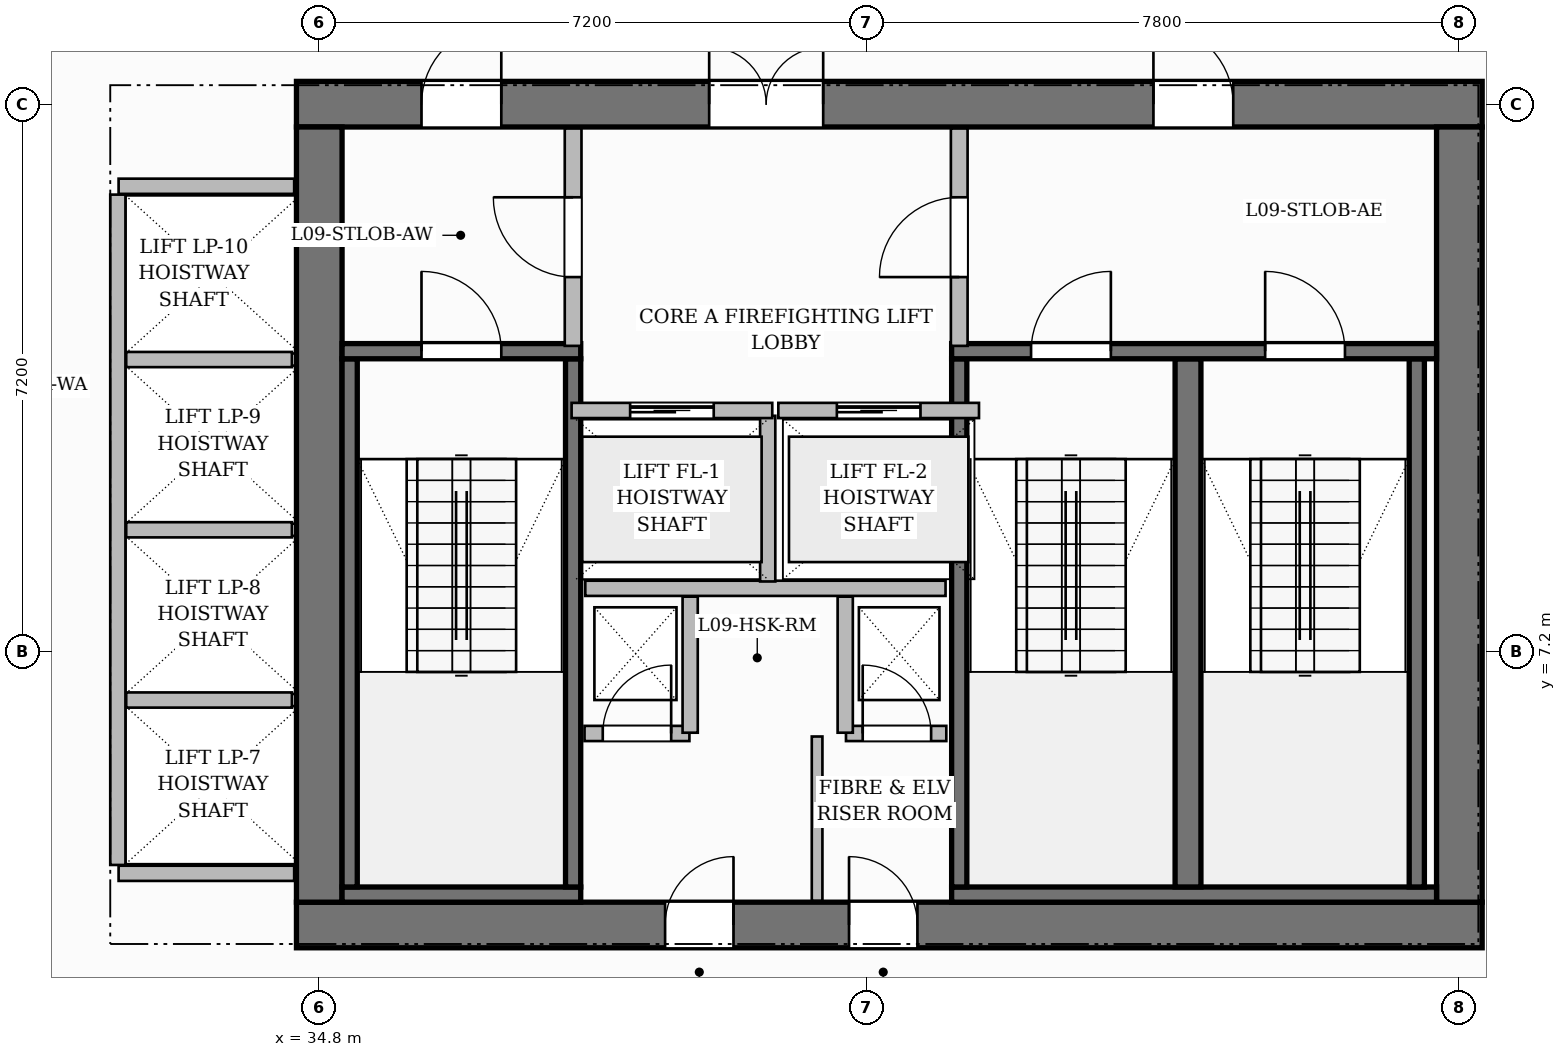
"""IFC4 building model, lengths in metres.
Left out: names, types, materials, properties, quantities, classifications, styles, units other than length and angle.
Written with IfcOpenShell. Run it as: python <this file> out.ifc"""

import sys

from ifc_helpers import new_model, si_unit, direction, frame, frame_2d, origin, place, context, subcontext, project, spatial, rectangle, extrude, source, transform, mapped, element, fill, save


model = new_model("IFC4")
c1 = context("Model", 3, precision=1e-05, world=origin(), true_north=direction((0.0, 1.0)))
c2 = subcontext(c1, "Body", "Model", "MODEL_VIEW")
j1 = project(units=[si_unit("LENGTHUNIT", "METRE"), si_unit("PLANEANGLEUNIT", "RADIAN")], contexts=[c1])
p1 = place(None, origin())
s1 = spatial("IfcSite", under=j1, at=p1, CompositionType="ELEMENT")
p2 = place(p1, origin())
s2 = spatial("IfcBuilding", under=s1, at=p2, CompositionType="ELEMENT")
p3 = place(p2, frame((0.0, 0.0, 43.5)))
s3 = spatial("IfcBuildingStorey", under=s2, at=p3, CompositionType="ELEMENT", Elevation=43.5)
p4 = place(p3, frame((34.5, 3.6, 0.0), z_axis=(0.0, 0.0, 1.0), x_axis=(1.0, 0.0, 0.0)))
e1 = element("IfcWall", 1, at=p4, inside=s3, PredefinedType="SHEAR", context=c2, shape_type="SweptSolid", body=[
    extrude(rectangle(XDim=15.6, YDim=0.6, at=frame_2d((7.8, 0.0))), origin(), (0.0, 0.0, 1.0), 3.7),
])
p5 = place(p4, frame((4.85, 0.0, 0.0)))
e2 = element("IfcOpeningElement", 2, at=p5, cuts=e1, PredefinedType="OPENING", context=c2, shape_type="SweptSolid", body=[
    extrude(rectangle(XDim=0.9, YDim=2.1, at=frame_2d((0.45, 1.05))), frame((0.0, 0.31, 0.0), z_axis=(0.0, -1.0, 0.0), x_axis=(1.0, 0.0, 0.0)), (0.0, 0.0, 1.0), 0.62),
])
p6 = place(p4, frame((7.27, 0.0, 0.0)))
e3 = element("IfcOpeningElement", 3, at=p6, cuts=e1, PredefinedType="OPENING", context=c2, shape_type="SweptSolid", body=[
    extrude(rectangle(XDim=0.9, YDim=2.1, at=frame_2d((0.45, 1.05))), frame((0.0, 0.31, 0.0), z_axis=(0.0, -1.0, 0.0), x_axis=(1.0, 0.0, 0.0)), (0.0, 0.0, 1.0), 0.62),
])
p7 = place(p3, frame((34.5, 14.4, 0.0), z_axis=(0.0, 0.0, 1.0), x_axis=(1.0, 0.0, 0.0)))
e4 = element("IfcWall", 4, at=p7, inside=s3, PredefinedType="SHEAR", context=c2, shape_type="SweptSolid", body=[
    extrude(rectangle(XDim=15.6, YDim=0.6, at=frame_2d((7.8, 0.0))), origin(), (0.0, 0.0, 1.0), 3.7),
])
p8 = place(p7, frame((5.43, 0.0, 0.0)))
e5 = element("IfcOpeningElement", 5, at=p8, cuts=e4, PredefinedType="OPENING", context=c2, shape_type="SweptSolid", body=[
    extrude(rectangle(XDim=1.5, YDim=2.2, at=frame_2d((0.75, 1.1))), frame((0.0, 0.31, 0.0), z_axis=(0.0, -1.0, 0.0), x_axis=(1.0, 0.0, 0.0)), (0.0, 0.0, 1.0), 0.62),
])
p9 = place(p7, frame((1.645, 0.0, 0.0)))
e6 = element("IfcOpeningElement", 6, at=p9, cuts=e4, PredefinedType="OPENING", context=c2, shape_type="SweptSolid", body=[
    extrude(rectangle(XDim=1.05, YDim=2.15, at=frame_2d((0.525, 1.075))), frame((0.0, 0.31, 0.0), z_axis=(0.0, -1.0, 0.0), x_axis=(1.0, 0.0, 0.0)), (0.0, 0.0, 1.0), 0.62),
])
p10 = place(p7, frame((11.275, 0.0, 0.0)))
e7 = element("IfcOpeningElement", 7, at=p10, cuts=e4, PredefinedType="OPENING", context=c2, shape_type="SweptSolid", body=[
    extrude(rectangle(XDim=1.05, YDim=2.15, at=frame_2d((0.525, 1.075))), frame((0.0, 0.31, 0.0), z_axis=(0.0, -1.0, 0.0), x_axis=(1.0, 0.0, 0.0)), (0.0, 0.0, 1.0), 0.62),
])
for number, where, z_axis, x_axis in (
    (8, (34.8, 3.9, 0.0), (0.0, 0.0, 1.0), (0.0, 1.0, 0.0)),
    (9, (49.8, 3.9, 0.0), (0.0, 0.0, 1.0), (0.0, 1.0, 0.0)),
):
    element("IfcWall", number, at=place(p3, frame(where, z_axis=z_axis, x_axis=x_axis)), inside=s3, PredefinedType="SHEAR", context=c2, shape_type="SweptSolid", body=[
        extrude(rectangle(XDim=10.2, YDim=0.6, at=frame_2d((5.1, 0.0))), origin(), (0.0, 0.0, 1.0), 3.7),
    ])
p11 = place(p3, frame((35.1, 4.0, 0.0), z_axis=(0.0, 0.0, 1.0), x_axis=(1.0, 0.0, 0.0)))
e10 = element("IfcWall", 10, at=p11, inside=s3, PredefinedType="SHEAR", context=c2, shape_type="SweptSolid", body=[
    extrude(rectangle(XDim=3.14, YDim=0.2, at=frame_2d((1.57, 0.0))), origin(), (0.0, 0.0, 1.0), 3.7),
])
for number, where, z_axis, x_axis in (
    (11, (35.2, 4.1, 0.0), (0.0, 0.0, 1.0), (0.0, 1.0, 0.0)),
    (12, (38.14, 4.1, 0.0), (0.0, 0.0, 1.0), (0.0, 1.0, 0.0)),
):
    element("IfcWall", number, at=place(p3, frame(where, z_axis=z_axis, x_axis=x_axis)), inside=s3, PredefinedType="SHEAR", context=c2, shape_type="SweptSolid", body=[
        extrude(rectangle(XDim=6.95, YDim=0.2, at=frame_2d((3.475, 0.0))), origin(), (0.0, 0.0, 1.0), 3.7),
    ])
p12 = place(p3, frame((35.1, 11.15, 0.0), z_axis=(0.0, 0.0, 1.0), x_axis=(1.0, 0.0, 0.0)))
e13 = element("IfcWall", 13, at=p12, inside=s3, PredefinedType="SHEAR", context=c2, shape_type="SweptSolid", body=[
    extrude(rectangle(XDim=3.14, YDim=0.2, at=frame_2d((1.57, 0.0))), origin(), (0.0, 0.0, 1.0), 3.7),
])
p13 = place(p12, frame((1.045, 0.0, 0.0)))
e14 = element("IfcOpeningElement", 14, at=p13, cuts=e13, PredefinedType="OPENING", context=c2, shape_type="SweptSolid", body=[
    extrude(rectangle(XDim=1.05, YDim=2.2, at=frame_2d((0.525, 1.1))), frame((0.0, 0.11, 0.0), z_axis=(0.0, -1.0, 0.0), x_axis=(1.0, 0.0, 0.0)), (0.0, 0.0, 1.0), 0.22),
])
p14 = place(p3, frame((43.12, 4.0, 0.0), z_axis=(0.0, 0.0, 1.0), x_axis=(1.0, 0.0, 0.0)))
e15 = element("IfcWall", 15, at=p14, inside=s3, PredefinedType="SHEAR", context=c2, shape_type="SweptSolid", body=[
    extrude(rectangle(XDim=6.38, YDim=0.2, at=frame_2d((3.19, 0.0))), origin(), (0.0, 0.0, 1.0), 3.7),
])
p15 = place(p3, frame((43.22, 4.1, 0.0), z_axis=(0.0, 0.0, 1.0), x_axis=(0.0, 1.0, 0.0)))
e16 = element("IfcWall", 16, at=p15, inside=s3, PredefinedType="SHEAR", context=c2, shape_type="SweptSolid", body=[
    extrude(rectangle(XDim=6.95, YDim=0.2, at=frame_2d((3.475, 0.0))), origin(), (0.0, 0.0, 1.0), 3.7),
])
p16 = place(p3, frame((46.23, 4.1, 0.0), z_axis=(0.0, 0.0, 1.0), x_axis=(0.0, 1.0, 0.0)))
e17 = element("IfcWall", 17, at=p16, inside=s3, PredefinedType="SHEAR", context=c2, shape_type="SweptSolid", body=[
    extrude(rectangle(XDim=6.95, YDim=0.34, at=frame_2d((3.475, 0.0))), origin(), (0.0, 0.0, 1.0), 3.7),
])
p17 = place(p3, frame((49.24, 4.1, 0.0), z_axis=(0.0, 0.0, 1.0), x_axis=(0.0, 1.0, 0.0)))
e18 = element("IfcWall", 18, at=p17, inside=s3, PredefinedType="SHEAR", context=c2, shape_type="SweptSolid", body=[
    extrude(rectangle(XDim=6.95, YDim=0.2, at=frame_2d((3.475, 0.0))), origin(), (0.0, 0.0, 1.0), 3.7),
])
p18 = place(p3, frame((43.12, 11.15, 0.0), z_axis=(0.0, 0.0, 1.0), x_axis=(1.0, 0.0, 0.0)))
e19 = element("IfcWall", 19, at=p18, inside=s3, PredefinedType="SHEAR", context=c2, shape_type="SweptSolid", body=[
    extrude(rectangle(XDim=6.38, YDim=0.2, at=frame_2d((3.19, 0.0))), origin(), (0.0, 0.0, 1.0), 3.7),
])
p19 = place(p18, frame((1.045, 0.0, 0.0)))
e20 = element("IfcOpeningElement", 20, at=p19, cuts=e19, PredefinedType="OPENING", context=c2, shape_type="SweptSolid", body=[
    extrude(rectangle(XDim=1.05, YDim=2.2, at=frame_2d((0.525, 1.1))), frame((0.0, 0.11, 0.0), z_axis=(0.0, -1.0, 0.0), x_axis=(1.0, 0.0, 0.0)), (0.0, 0.0, 1.0), 0.22),
])
p20 = place(p18, frame((4.125, 0.0, 0.0)))
e21 = element("IfcOpeningElement", 21, at=p20, cuts=e19, PredefinedType="OPENING", context=c2, shape_type="SweptSolid", body=[
    extrude(rectangle(XDim=1.05, YDim=2.2, at=frame_2d((0.525, 1.1))), frame((0.0, 0.11, 0.0), z_axis=(0.0, -1.0, 0.0), x_axis=(1.0, 0.0, 0.0)), (0.0, 0.0, 1.0), 0.22),
])
p21 = place(p3, frame((38.3, 8.03, 0.0), z_axis=(0.0, 0.0, 1.0), x_axis=(1.0, 0.0, 0.0)))
e22 = element("IfcWall", 22, at=p21, inside=s3, PredefinedType="PARTITIONING", context=c2, shape_type="SweptSolid", body=[
    extrude(rectangle(XDim=4.74, YDim=0.2, at=frame_2d((2.37, 0.0))), origin(), (0.0, 0.0, 1.0), 3.45),
])
p22 = place(p3, frame((40.7, 8.12, 0.0), z_axis=(0.0, 0.0, 1.0), x_axis=(0.0, 1.0, 0.0)))
e23 = element("IfcWall", 23, at=p22, inside=s3, PredefinedType="PARTITIONING", context=c2, shape_type="SweptSolid", body=[
    extrude(rectangle(XDim=2.18, YDim=0.2, at=frame_2d((1.09, 0.0))), origin(), (0.0, 0.0, 1.0), 3.45),
])
p23 = place(p3, frame((38.14, 11.22, 0.0), z_axis=(0.0, 0.0, 1.0), x_axis=(0.0, 1.0, 0.0)))
e24 = element("IfcWall", 24, at=p23, inside=s3, PredefinedType="PARTITIONING", context=c2, shape_type="SweptSolid", body=[
    extrude(rectangle(XDim=2.86, YDim=0.22, at=frame_2d((1.43, 0.0))), origin(), (0.0, 0.0, 1.0), 3.45),
])
p24 = place(p23, frame((0.905, 0.0, 0.0)))
e25 = element("IfcOpeningElement", 25, at=p24, cuts=e24, PredefinedType="OPENING", context=c2, shape_type="SweptSolid", body=[
    extrude(rectangle(XDim=1.05, YDim=2.15, at=frame_2d((0.525, 1.075))), frame((0.0, 0.12, 0.0), z_axis=(0.0, -1.0, 0.0), x_axis=(1.0, 0.0, 0.0)), (0.0, 0.0, 1.0), 0.24),
])
p25 = place(p3, frame((43.22, 11.22, 0.0), z_axis=(0.0, 0.0, 1.0), x_axis=(0.0, 1.0, 0.0)))
e26 = element("IfcWall", 26, at=p25, inside=s3, PredefinedType="PARTITIONING", context=c2, shape_type="SweptSolid", body=[
    extrude(rectangle(XDim=2.86, YDim=0.22, at=frame_2d((1.43, 0.0))), origin(), (0.0, 0.0, 1.0), 3.45),
])
p26 = place(p25, frame((0.905, 0.0, 0.0)))
e27 = element("IfcOpeningElement", 27, at=p26, cuts=e26, PredefinedType="OPENING", context=c2, shape_type="SweptSolid", body=[
    extrude(rectangle(XDim=1.05, YDim=2.15, at=frame_2d((0.525, 1.075))), frame((0.0, 0.12, 0.0), z_axis=(0.0, -1.0, 0.0), x_axis=(1.0, 0.0, 0.0)), (0.0, 0.0, 1.0), 0.24),
])
p27 = place(p3, frame((38.29, 6.12, 0.0), z_axis=(0.0, 0.0, 1.0), x_axis=(1.0, 0.0, 0.0)))
e28 = element("IfcWall", 28, at=p27, inside=s3, PredefinedType="PARTITIONING", context=c2, shape_type="SweptSolid", body=[
    extrude(rectangle(XDim=1.38, YDim=0.2, at=frame_2d((0.69, 0.0))), origin(), (0.0, 0.0, 1.0), 3.45),
])
p28 = place(p27, frame((0.24, 0.0, 0.0)))
e29 = element("IfcOpeningElement", 29, at=p28, cuts=e28, PredefinedType="OPENING", context=c2, shape_type="SweptSolid", body=[
    extrude(rectangle(XDim=0.9, YDim=2.1, at=frame_2d((0.45, 1.05))), frame((0.0, 0.11, 0.0), z_axis=(0.0, -1.0, 0.0), x_axis=(1.0, 0.0, 0.0)), (0.0, 0.0, 1.0), 0.22),
])
p29 = place(p3, frame((39.68, 6.13, 0.0), z_axis=(0.0, 0.0, 1.0), x_axis=(0.0, 1.0, 0.0)))
e30 = element("IfcWall", 30, at=p29, inside=s3, PredefinedType="PARTITIONING", context=c2, shape_type="SweptSolid", body=[
    extrude(rectangle(XDim=1.79, YDim=0.2, at=frame_2d((0.895, 0.0))), origin(), (0.0, 0.0, 1.0), 3.45),
])
p30 = place(p3, frame((41.73, 6.12, 0.0), z_axis=(0.0, 0.0, 1.0), x_axis=(1.0, 0.0, 0.0)))
e31 = element("IfcWall", 31, at=p30, inside=s3, PredefinedType="PARTITIONING", context=c2, shape_type="SweptSolid", body=[
    extrude(rectangle(XDim=1.32, YDim=0.2, at=frame_2d((0.66, 0.0))), origin(), (0.0, 0.0, 1.0), 3.45),
])
p31 = place(p30, frame((0.22, 0.0, 0.0)))
e32 = element("IfcOpeningElement", 32, at=p31, cuts=e31, PredefinedType="OPENING", context=c2, shape_type="SweptSolid", body=[
    extrude(rectangle(XDim=0.9, YDim=2.1, at=frame_2d((0.45, 1.05))), frame((0.0, 0.11, 0.0), z_axis=(0.0, -1.0, 0.0), x_axis=(1.0, 0.0, 0.0)), (0.0, 0.0, 1.0), 0.22),
])
p32 = place(p3, frame((41.72, 6.13, 0.0), z_axis=(0.0, 0.0, 1.0), x_axis=(0.0, 1.0, 0.0)))
e33 = element("IfcWall", 33, at=p32, inside=s3, PredefinedType="PARTITIONING", context=c2, shape_type="SweptSolid", body=[
    extrude(rectangle(XDim=1.79, YDim=0.2, at=frame_2d((0.895, 0.0))), origin(), (0.0, 0.0, 1.0), 3.45),
])
p33 = place(p3, frame((41.35, 3.92, 0.0), z_axis=(0.0, 0.0, 1.0), x_axis=(0.0, 1.0, 0.0)))
e34 = element("IfcWall", 34, at=p33, inside=s3, PredefinedType="PARTITIONING", context=c2, shape_type="SweptSolid", body=[
    extrude(rectangle(XDim=2.16, YDim=0.14, at=frame_2d((1.08, 0.0))), origin(), (0.0, 0.0, 1.0), 3.45),
])
for number, where, z_axis, x_axis in (
    (35, (32.16, 4.28, 0.0), (0.0, 0.0, 1.0), (1.0, 0.0, 0.0)),
    (36, (32.16, 13.32, 0.0), (0.0, 0.0, 1.0), (1.0, 0.0, 0.0)),
):
    element("IfcWall", number, at=place(p3, frame(where, z_axis=z_axis, x_axis=x_axis)), inside=s3, PredefinedType="PARTITIONING", context=c2, shape_type="SweptSolid", body=[
        extrude(rectangle(XDim=2.31, YDim=0.2, at=frame_2d((1.155, 0.0))), origin(), (0.0, 0.0, 1.0), 3.45),
    ])
p34 = place(p3, frame((32.15, 4.39, 0.0), z_axis=(0.0, 0.0, 1.0), x_axis=(0.0, 1.0, 0.0)))
e37 = element("IfcWall", 37, at=p34, inside=s3, PredefinedType="PARTITIONING", context=c2, shape_type="SweptSolid", body=[
    extrude(rectangle(XDim=8.82, YDim=0.2, at=frame_2d((4.41, 0.0))), origin(), (0.0, 0.0, 1.0), 3.45),
])
for number, where, z_axis, x_axis in (
    (38, (32.26, 6.56, 0.0), (0.0, 0.0, 1.0), (1.0, 0.0, 0.0)),
    (39, (32.26, 8.8, 0.0), (0.0, 0.0, 1.0), (1.0, 0.0, 0.0)),
    (40, (32.26, 11.04, 0.0), (0.0, 0.0, 1.0), (1.0, 0.0, 0.0)),
):
    element("IfcWall", number, at=place(p3, frame(where, z_axis=z_axis, x_axis=x_axis)), inside=s3, PredefinedType="PARTITIONING", context=c2, shape_type="SweptSolid", body=[
        extrude(rectangle(XDim=2.18, YDim=0.2, at=frame_2d((1.09, 0.0))), origin(), (0.0, 0.0, 1.0), 3.45),
    ])
p35 = place(p3, frame((38.12, 10.37, 0.0), z_axis=(0.0, 0.0, 1.0), x_axis=(1.0, 0.0, 0.0)))
e41 = element("IfcWall", 41, at=p35, inside=s3, PredefinedType="PARTITIONING", context=c2, shape_type="SweptSolid", body=[
    extrude(rectangle(XDim=2.64, YDim=0.2, at=frame_2d((1.32, 0.0))), origin(), (0.0, 0.0, 1.0), 3.45),
])
p36 = place(p35, frame((0.77, 0.0, 0.0)))
e42 = element("IfcOpeningElement", 42, at=p36, cuts=e41, PredefinedType="OPENING", context=c2, shape_type="SweptSolid", body=[
    extrude(rectangle(XDim=1.1, YDim=2.2, at=frame_2d((0.55, 1.1))), frame((0.0, 0.11, 0.0), z_axis=(0.0, -1.0, 0.0), x_axis=(1.0, 0.0, 0.0)), (0.0, 0.0, 1.0), 0.22),
])
p37 = place(p3, frame((40.84, 10.37, 0.0), z_axis=(0.0, 0.0, 1.0), x_axis=(1.0, 0.0, 0.0)))
e43 = element("IfcWall", 43, at=p37, inside=s3, PredefinedType="PARTITIONING", context=c2, shape_type="SweptSolid", body=[
    extrude(rectangle(XDim=2.64, YDim=0.2, at=frame_2d((1.32, 0.0))), origin(), (0.0, 0.0, 1.0), 3.45),
])
p38 = place(p37, frame((0.77, 0.0, 0.0)))
e44 = element("IfcOpeningElement", 44, at=p38, cuts=e43, PredefinedType="OPENING", context=c2, shape_type="SweptSolid", body=[
    extrude(rectangle(XDim=1.1, YDim=2.2, at=frame_2d((0.55, 1.1))), frame((0.0, 0.11, 0.0), z_axis=(0.0, -1.0, 0.0), x_axis=(1.0, 0.0, 0.0)), (0.0, 0.0, 1.0), 0.22),
])
m1 = source(origin(), c2, "Body", "SweptSolid", [
    extrude(rectangle(XDim=1.05, YDim=2.2, at=frame_2d((0.525, 1.1))), frame((0.0, 0.025, 0.0), z_axis=(0.0, -1.0, 0.0), x_axis=(1.0, 0.0, 0.0)), (0.0, 0.0, 1.0), 0.05),
])
p39 = place(p13, origin())
e45 = element("IfcDoor", 45, at=p39, inside=s3, OperationType="SINGLE_SWING_LEFT", PredefinedType="DOOR", context=c2, shape_type="MappedRepresentation", body=[
    mapped(m1, transform((0.0, 0.0, 0.0), scale=1.0)),
])
fill(e14, e45)
p40 = place(p19, origin())
e46 = element("IfcDoor", 46, at=p40, inside=s3, OperationType="SINGLE_SWING_RIGHT", PredefinedType="DOOR", context=c2, shape_type="MappedRepresentation", body=[
    mapped(m1, transform((0.0, 0.0, 0.0), scale=1.0)),
])
fill(e20, e46)
p41 = place(p20, origin())
e47 = element("IfcDoor", 47, at=p41, inside=s3, OperationType="SINGLE_SWING_LEFT", PredefinedType="DOOR", context=c2, shape_type="MappedRepresentation", body=[
    mapped(m1, transform((0.0, 0.0, 0.0), scale=1.0)),
])
fill(e21, e47)
m2 = source(origin(), c2, "Body", "SweptSolid", [
    extrude(rectangle(XDim=1.05, YDim=2.15, at=frame_2d((0.525, 1.075))), frame((0.0, 0.025, 0.0), z_axis=(0.0, -1.0, 0.0), x_axis=(1.0, 0.0, 0.0)), (0.0, 0.0, 1.0), 0.05),
])
p42 = place(p24, origin())
e48 = element("IfcDoor", 48, at=p42, inside=s3, OperationType="SINGLE_SWING_RIGHT", PredefinedType="DOOR", context=c2, shape_type="MappedRepresentation", body=[
    mapped(m2, transform((0.0, 0.0, 0.0), scale=1.0)),
])
fill(e25, e48)
p43 = place(p26, origin())
e49 = element("IfcDoor", 49, at=p43, inside=s3, OperationType="SINGLE_SWING_LEFT", PredefinedType="DOOR", context=c2, shape_type="MappedRepresentation", body=[
    mapped(m2, transform((0.0, 0.0, 0.0), scale=1.0)),
])
fill(e27, e49)
m3 = source(origin(), c2, "Body", "SweptSolid", [
    extrude(rectangle(XDim=1.5, YDim=2.2, at=frame_2d((0.75, 1.1))), frame((0.0, 0.025, 0.0), z_axis=(0.0, -1.0, 0.0), x_axis=(1.0, 0.0, 0.0)), (0.0, 0.0, 1.0), 0.05),
])
p44 = place(p8, origin())
e50 = element("IfcDoor", 50, at=p44, inside=s3, OperationType="DOUBLE_DOOR_SINGLE_SWING", PredefinedType="DOOR", context=c2, shape_type="MappedRepresentation", body=[
    mapped(m3, transform((0.0, 0.0, 0.0), scale=1.0)),
])
fill(e5, e50)
p45 = place(p9, origin())
e51 = element("IfcDoor", 51, at=p45, inside=s3, OperationType="SINGLE_SWING_RIGHT", PredefinedType="DOOR", context=c2, shape_type="MappedRepresentation", body=[
    mapped(m2, transform((0.0, 0.0, 0.0), scale=1.0)),
])
fill(e6, e51)
p46 = place(p10, origin())
e52 = element("IfcDoor", 52, at=p46, inside=s3, OperationType="SINGLE_SWING_LEFT", PredefinedType="DOOR", context=c2, shape_type="MappedRepresentation", body=[
    mapped(m2, transform((0.0, 0.0, 0.0), scale=1.0)),
])
fill(e7, e52)
m4 = source(origin(), c2, "Body", "SweptSolid", [
    extrude(rectangle(XDim=0.9, YDim=2.1, at=frame_2d((0.45, 1.05))), frame((0.0, 0.025, 0.0), z_axis=(0.0, -1.0, 0.0), x_axis=(1.0, 0.0, 0.0)), (0.0, 0.0, 1.0), 0.05),
])
p47 = place(p28, origin())
e53 = element("IfcDoor", 53, at=p47, inside=s3, OperationType="SINGLE_SWING_RIGHT", PredefinedType="DOOR", context=c2, shape_type="MappedRepresentation", body=[
    mapped(m4, transform((0.0, 0.0, 0.0), scale=1.0)),
])
fill(e29, e53)
p48 = place(p31, origin())
e54 = element("IfcDoor", 54, at=p48, inside=s3, OperationType="SINGLE_SWING_LEFT", PredefinedType="DOOR", context=c2, shape_type="MappedRepresentation", body=[
    mapped(m4, transform((0.0, 0.0, 0.0), scale=1.0)),
])
fill(e32, e54)
p49 = place(p5, origin())
e55 = element("IfcDoor", 55, at=p49, inside=s3, OperationType="SINGLE_SWING_RIGHT", PredefinedType="DOOR", context=c2, shape_type="MappedRepresentation", body=[
    mapped(m4, transform((0.0, 0.0, 0.0), scale=1.0)),
])
fill(e2, e55)
p50 = place(p6, origin())
e56 = element("IfcDoor", 56, at=p50, inside=s3, OperationType="SINGLE_SWING_LEFT", PredefinedType="DOOR", context=c2, shape_type="MappedRepresentation", body=[
    mapped(m4, transform((0.0, 0.0, 0.0), scale=1.0)),
])
fill(e3, e56)
m5 = source(origin(), c2, "Body", "SweptSolid", [
    extrude(rectangle(XDim=1.1, YDim=2.2, at=frame_2d((0.55, 1.1))), frame((0.0, 0.025, 0.0), z_axis=(0.0, -1.0, 0.0), x_axis=(1.0, 0.0, 0.0)), (0.0, 0.0, 1.0), 0.05),
])
p51 = place(p36, origin())
e57 = element("IfcDoor", 57, at=p51, inside=s3, OperationType="SLIDING_TO_LEFT", PredefinedType="DOOR", context=c2, shape_type="MappedRepresentation", body=[
    mapped(m5, transform((0.0, 0.0, 0.0), scale=1.0)),
])
fill(e42, e57)
p52 = place(p38, origin())
e58 = element("IfcDoor", 58, at=p52, inside=s3, OperationType="SLIDING_TO_LEFT", PredefinedType="DOOR", context=c2, shape_type="MappedRepresentation", body=[
    mapped(m5, transform((0.0, 0.0, 0.0), scale=1.0)),
])
fill(e44, e58)
save(model, sys.argv[1])
